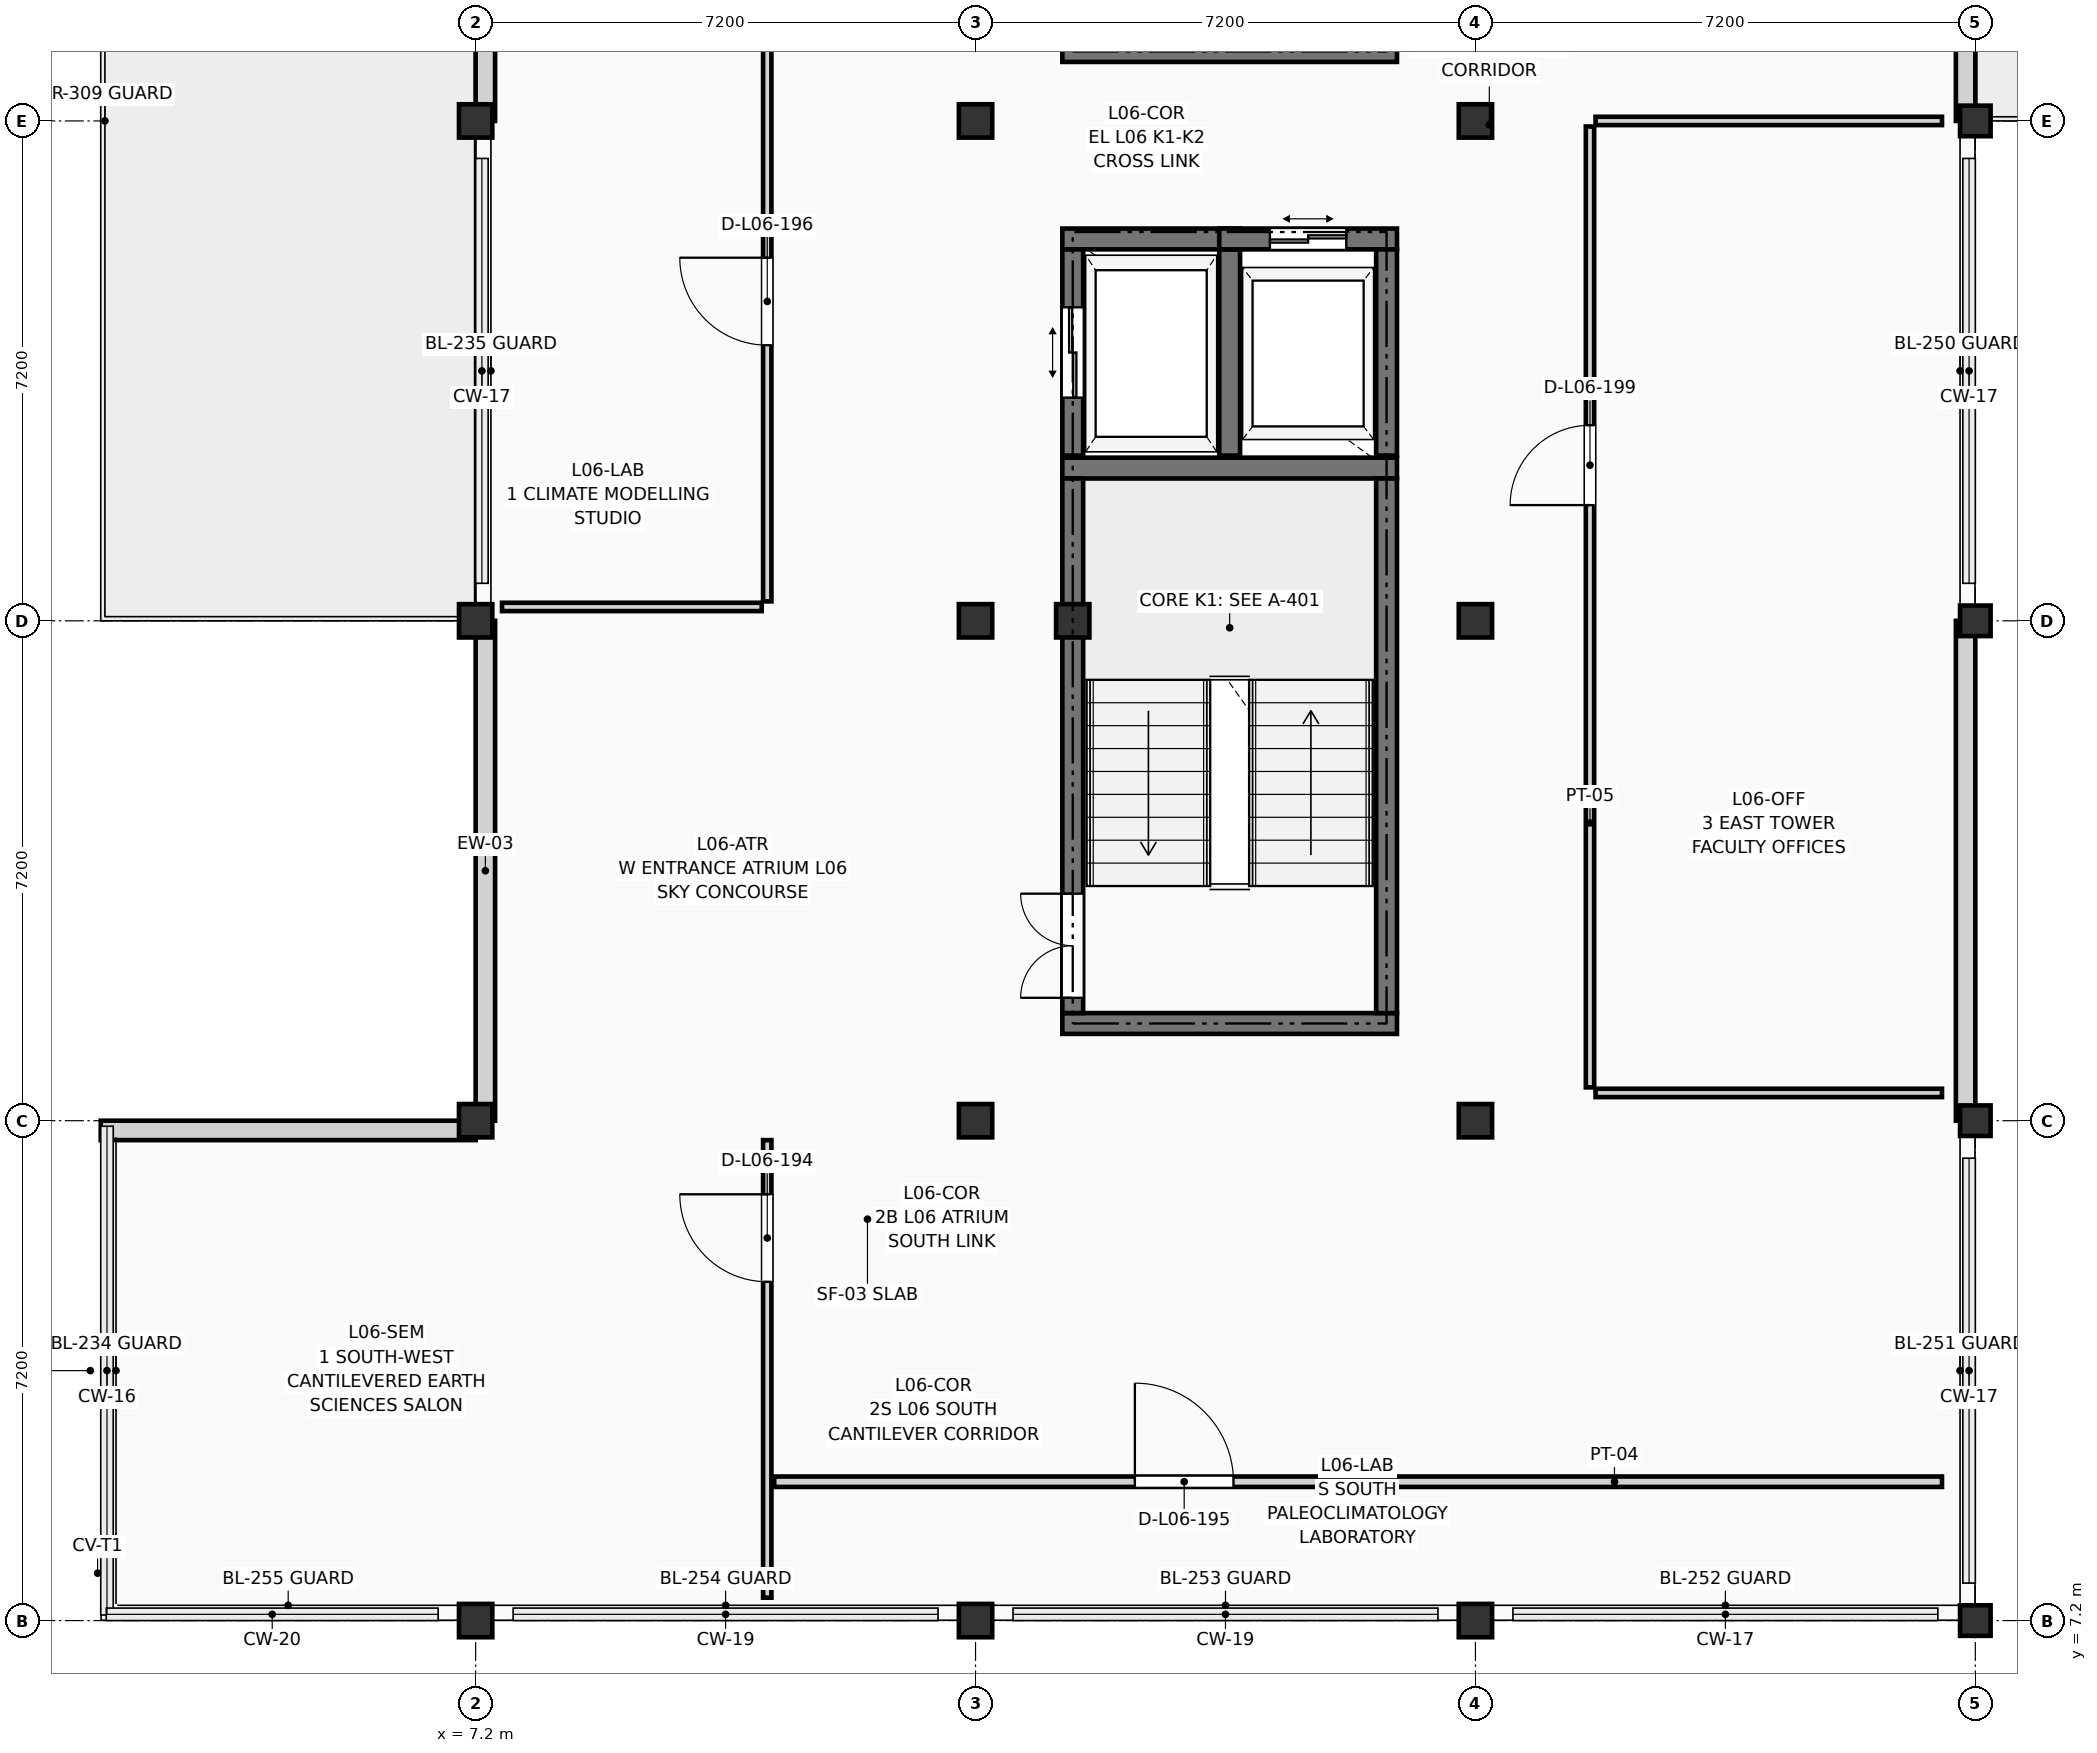
"""IFC4 building model, lengths in metres.
Left out: names, types, materials, properties, quantities, classifications, styles, units other than length and angle.
Written with IfcOpenShell. Run it as: python <this file> out.ifc"""

import sys

from ifc_helpers import new_model, si_unit, direction, frame, frame_2d, origin, origin_2d, place, context, subcontext, project, spatial, rectangle, extrude, element, fill, save


model = new_model("IFC4")
c1 = context("Model", 3, precision=1e-05, world=origin(), true_north=direction((0.0, 1.0)))
c2 = subcontext(c1, "Body", "Model", "MODEL_VIEW")
j1 = project(units=[si_unit("LENGTHUNIT", "METRE"), si_unit("PLANEANGLEUNIT", "RADIAN")], contexts=[c1])
p1 = place(None, origin())
s1 = spatial("IfcSite", under=j1, at=p1, CompositionType="ELEMENT")
p2 = place(p1, origin())
s2 = spatial("IfcBuilding", under=s1, at=p2, CompositionType="ELEMENT")
p3 = place(p2, frame((0.0, 0.0, 22.95)))
s3 = spatial("IfcBuildingStorey", under=s2, at=p3, CompositionType="ELEMENT", Elevation=22.95)
for number, where, z_axis, x_axis in (
    (1, (7.2, 7.2, 0.0), (0.0, 0.0, 1.0), (1.0, 0.0, 0.0)),
    (2, (7.2, 14.4, 0.0), (0.0, 0.0, 1.0), (1.0, 0.0, 0.0)),
    (3, (7.2, 21.6, 0.0), (0.0, 0.0, 1.0), (1.0, 0.0, 0.0)),
    (4, (7.2, 28.8, 0.0), (0.0, 0.0, 1.0), (1.0, 0.0, 0.0)),
    (5, (14.4, 7.2, 0.0), (0.0, 0.0, 1.0), (1.0, 0.0, 0.0)),
    (6, (14.4, 14.4, 0.0), (0.0, 0.0, 1.0), (1.0, 0.0, 0.0)),
    (7, (14.4, 21.6, 0.0), (0.0, 0.0, 1.0), (1.0, 0.0, 0.0)),
    (8, (14.4, 28.8, 0.0), (0.0, 0.0, 1.0), (1.0, 0.0, 0.0)),
    (9, (15.8, 21.6, 0.0), (0.0, 0.0, 1.0), (1.0, 0.0, 0.0)),
    (10, (21.6, 7.2, 0.0), (0.0, 0.0, 1.0), (1.0, 0.0, 0.0)),
    (11, (21.6, 14.4, 0.0), (0.0, 0.0, 1.0), (1.0, 0.0, 0.0)),
    (12, (21.6, 21.6, 0.0), (0.0, 0.0, 1.0), (1.0, 0.0, 0.0)),
    (13, (21.6, 28.8, 0.0), (0.0, 0.0, 1.0), (1.0, 0.0, 0.0)),
):
    element("IfcColumn", number, at=place(p3, frame(where, z_axis=z_axis, x_axis=x_axis)), inside=s3, PredefinedType="COLUMN", context=c2, shape_type="SweptSolid", body=[
        extrude(rectangle(XDim=0.48, YDim=0.48, at=origin_2d()), origin(), (0.0, 0.0, 1.0), 3.3),
    ])
for number, where, z_axis, x_axis in (
    (14, (28.8, 7.2, 0.0), (0.0, 0.0, 1.0), (1.0, 0.0, 0.0)),
    (15, (28.8, 14.4, 0.0), (0.0, 0.0, 1.0), (1.0, 0.0, 0.0)),
    (16, (28.8, 21.6, 0.0), (0.0, 0.0, 1.0), (1.0, 0.0, 0.0)),
    (17, (28.8, 28.8, 0.0), (0.0, 0.0, 1.0), (1.0, 0.0, 0.0)),
):
    element("IfcColumn", number, at=place(p3, frame(where, z_axis=z_axis, x_axis=x_axis)), inside=s3, PredefinedType="COLUMN", context=c2, shape_type="SweptSolid", body=[
        extrude(rectangle(XDim=0.44, YDim=0.44, at=origin_2d()), origin(), (0.0, 0.0, 1.0), 3.3),
    ])
p4 = place(p3, frame((1.8, 14.26, 0.0), z_axis=(0.0, 0.0, 1.0), x_axis=(1.0, 0.0, 0.0)))
e18 = element("IfcWall", 18, at=p4, inside=s3, PredefinedType="SOLIDWALL", context=c2, shape_type="SweptSolid", body=[
    extrude(rectangle(XDim=5.4, YDim=0.28, at=frame_2d((2.7, 0.0))), origin(), (0.0, 0.0, 1.0), 2.396),
])
p5 = place(p3, frame((7.34, 14.4, 0.0), z_axis=(0.0, 0.0, 1.0), x_axis=(0.0, 1.0, 0.0)))
e19 = element("IfcWall", 19, at=p5, inside=s3, PredefinedType="SOLIDWALL", context=c2, shape_type="SweptSolid", body=[
    extrude(rectangle(XDim=7.2, YDim=0.28, at=frame_2d((3.6, 0.0))), origin(), (0.0, 0.0, 1.0), 2.54),
])
p6 = place(p3, frame((7.34, 28.8, 0.0), z_axis=(0.0, 0.0, 1.0), x_axis=(0.0, 1.0, 0.0)))
e20 = element("IfcWall", 20, at=p6, inside=s3, PredefinedType="SOLIDWALL", context=c2, shape_type="SweptSolid", body=[
    extrude(rectangle(XDim=7.2, YDim=0.28, at=frame_2d((3.6, 0.0))), origin(), (0.0, 0.0, 1.0), 2.54),
])
p7 = place(p6, frame((2.9, 0.0, 0.0)))
e21 = element("IfcOpeningElement", 21, at=p7, cuts=e20, PredefinedType="OPENING", context=c2, shape_type="SweptSolid", body=[
    extrude(rectangle(XDim=1.4, YDim=2.2, at=frame_2d((0.7, 1.1))), frame((0.0, 0.152, 0.0), z_axis=(0.0, -1.0, 0.0), x_axis=(1.0, 0.0, 0.0)), (0.0, 0.0, 1.0), 0.304),
])
p8 = place(p3, frame((28.66, 28.8, 0.0), z_axis=(0.0, 0.0, 1.0), x_axis=(0.0, 1.0, 0.0)))
e22 = element("IfcWall", 22, at=p8, inside=s3, PredefinedType="SOLIDWALL", context=c2, shape_type="SweptSolid", body=[
    extrude(rectangle(XDim=7.2, YDim=0.28, at=frame_2d((3.6, 0.0))), origin(), (0.0, 0.0, 1.0), 2.54),
])
p9 = place(p8, frame((2.8, 0.0, 0.0)))
e23 = element("IfcOpeningElement", 23, at=p9, cuts=e22, PredefinedType="OPENING", context=c2, shape_type="SweptSolid", body=[
    extrude(rectangle(XDim=1.6, YDim=2.25, at=frame_2d((0.8, 1.125))), frame((0.0, 0.152, 0.0), z_axis=(0.0, -1.0, 0.0), x_axis=(1.0, 0.0, 0.0)), (0.0, 0.0, 1.0), 0.304),
])
p10 = place(p3, frame((28.66, 14.4, 0.0), z_axis=(0.0, 0.0, 1.0), x_axis=(0.0, 1.0, 0.0)))
e24 = element("IfcWall", 24, at=p10, inside=s3, PredefinedType="SOLIDWALL", context=c2, shape_type="SweptSolid", body=[
    extrude(rectangle(XDim=7.2, YDim=0.28, at=frame_2d((3.6, 0.0))), origin(), (0.0, 0.0, 1.0), 2.54),
])
for number, where, z_axis, x_axis in (
    (25, (15.65, 15.8, 0.0), (0.0, 0.0, 1.0), (1.0, 0.0, 0.0)),
    (26, (15.65, 23.8, 0.0), (0.0, 0.0, 1.0), (1.0, 0.0, 0.0)),
):
    element("IfcWall", number, at=place(p3, frame(where, z_axis=z_axis, x_axis=x_axis)), inside=s3, PredefinedType="SHEAR", context=c2, shape_type="SweptSolid", body=[
        extrude(rectangle(XDim=4.82, YDim=0.3, at=frame_2d((2.41, 0.0))), origin(), (0.0, 0.0, 1.0), 3.09),
    ])
p11 = place(p3, frame((15.8, 15.95, 0.0), z_axis=(0.0, 0.0, 1.0), x_axis=(0.0, 1.0, 0.0)))
e27 = element("IfcWall", 27, at=p11, inside=s3, PredefinedType="SHEAR", context=c2, shape_type="SweptSolid", body=[
    extrude(rectangle(XDim=7.7, YDim=0.3, at=frame_2d((3.85, 0.0))), origin(), (0.0, 0.0, 1.0), 3.09),
])
p12 = place(p11, frame((0.22, 0.0, 0.0)))
e28 = element("IfcOpeningElement", 28, at=p12, cuts=e27, PredefinedType="OPENING", context=c2, shape_type="SweptSolid", body=[
    extrude(rectangle(XDim=1.5, YDim=2.2, at=frame_2d((0.75, 1.1))), frame((0.0, 0.162, 0.0), z_axis=(0.0, -1.0, 0.0), x_axis=(1.0, 0.0, 0.0)), (0.0, 0.0, 1.0), 0.324),
])
p13 = place(p3, frame((20.32, 15.95, 0.0), z_axis=(0.0, 0.0, 1.0), x_axis=(0.0, 1.0, 0.0)))
e29 = element("IfcWall", 29, at=p13, inside=s3, PredefinedType="SHEAR", context=c2, shape_type="SweptSolid", body=[
    extrude(rectangle(XDim=7.7, YDim=0.3, at=frame_2d((3.85, 0.0))), origin(), (0.0, 0.0, 1.0), 3.09),
])
p14 = place(p3, frame((15.65, 29.8, 0.0), z_axis=(0.0, 0.0, 1.0), x_axis=(1.0, 0.0, 0.0)))
e30 = element("IfcWall", 30, at=p14, inside=s3, PredefinedType="SHEAR", context=c2, shape_type="SweptSolid", body=[
    extrude(rectangle(XDim=4.82, YDim=0.3, at=frame_2d((2.41, 0.0))), origin(), (0.0, 0.0, 1.0), 3.09),
])
p15 = place(p3, frame((15.65, 27.1, 0.0), z_axis=(0.0, 0.0, 1.0), x_axis=(1.0, 0.0, 0.0)))
e31 = element("IfcWall", 31, at=p15, inside=s3, PredefinedType="SHEAR", context=c2, shape_type="SweptSolid", body=[
    extrude(rectangle(XDim=2.56, YDim=0.3, at=frame_2d((1.28, 0.0))), origin(), (0.0, 0.0, 1.0), 3.09),
])
p16 = place(p3, frame((15.8, 23.98, 0.0), z_axis=(0.0, 0.0, 1.0), x_axis=(0.0, 1.0, 0.0)))
e32 = element("IfcWall", 32, at=p16, inside=s3, PredefinedType="SHEAR", context=c2, shape_type="SweptSolid", body=[
    extrude(rectangle(XDim=2.97, YDim=0.3, at=frame_2d((1.485, 0.0))), origin(), (0.0, 0.0, 1.0), 3.09),
])
p17 = place(p16, frame((0.835, 0.0, 0.0)))
e33 = element("IfcOpeningElement", 33, at=p17, cuts=e32, PredefinedType="OPENING", context=c2, shape_type="SweptSolid", body=[
    extrude(rectangle(XDim=1.3, YDim=2.25, at=frame_2d((0.65, 1.125))), frame((0.0, 0.162, 0.0), z_axis=(0.0, -1.0, 0.0), x_axis=(1.0, 0.0, 0.0)), (0.0, 0.0, 1.0), 0.324),
])
p18 = place(p3, frame((18.06, 23.98, 0.0), z_axis=(0.0, 0.0, 1.0), x_axis=(0.0, 1.0, 0.0)))
e34 = element("IfcWall", 34, at=p18, inside=s3, PredefinedType="SHEAR", context=c2, shape_type="SweptSolid", body=[
    extrude(rectangle(XDim=2.97, YDim=0.3, at=frame_2d((1.485, 0.0))), origin(), (0.0, 0.0, 1.0), 3.09),
])
p19 = place(p3, frame((17.91, 27.1, 0.0), z_axis=(0.0, 0.0, 1.0), x_axis=(1.0, 0.0, 0.0)))
e35 = element("IfcWall", 35, at=p19, inside=s3, PredefinedType="SHEAR", context=c2, shape_type="SweptSolid", body=[
    extrude(rectangle(XDim=2.56, YDim=0.3, at=frame_2d((1.28, 0.0))), origin(), (0.0, 0.0, 1.0), 3.09),
])
p20 = place(p19, frame((0.73, 0.0, 0.0)))
e36 = element("IfcOpeningElement", 36, at=p20, cuts=e35, PredefinedType="OPENING", context=c2, shape_type="SweptSolid", body=[
    extrude(rectangle(XDim=1.1, YDim=2.2, at=frame_2d((0.55, 1.1))), frame((0.0, 0.162, 0.0), z_axis=(0.0, -1.0, 0.0), x_axis=(1.0, 0.0, 0.0)), (0.0, 0.0, 1.0), 0.324),
])
p21 = place(p3, frame((20.32, 23.98, 0.0), z_axis=(0.0, 0.0, 1.0), x_axis=(0.0, 1.0, 0.0)))
e37 = element("IfcWall", 37, at=p21, inside=s3, PredefinedType="SHEAR", context=c2, shape_type="SweptSolid", body=[
    extrude(rectangle(XDim=2.97, YDim=0.3, at=frame_2d((1.485, 0.0))), origin(), (0.0, 0.0, 1.0), 3.09),
])
p22 = place(p3, frame((11.4, 7.53, 0.0), z_axis=(0.0, 0.0, 1.0), x_axis=(0.0, 1.0, 0.0)))
e38 = element("IfcWall", 38, at=p22, inside=s3, PredefinedType="PARTITIONING", context=c2, shape_type="SweptSolid", body=[
    extrude(rectangle(XDim=6.59, YDim=0.12, at=frame_2d((3.295, 0.0))), origin(), (0.0, 0.0, 1.0), 3.075),
])
p23 = place(p22, frame((4.55, 0.0, 0.0)))
e39 = element("IfcOpeningElement", 39, at=p23, cuts=e38, PredefinedType="OPENING", context=c2, shape_type="SweptSolid", body=[
    extrude(rectangle(XDim=1.26, YDim=2.18, at=frame_2d((0.63, 1.09))), frame((0.0, 0.072, 0.0), z_axis=(0.0, -1.0, 0.0), x_axis=(1.0, 0.0, 0.0)), (0.0, 0.0, 1.0), 0.144),
])
p24 = place(p3, frame((11.5, 9.2, 0.0), z_axis=(0.0, 0.0, 1.0), x_axis=(1.0, 0.0, 0.0)))
e40 = element("IfcWall", 40, at=p24, inside=s3, PredefinedType="PARTITIONING", context=c2, shape_type="SweptSolid", body=[
    extrude(rectangle(XDim=16.82, YDim=0.15, at=frame_2d((8.41, 0.0))), origin(), (0.0, 0.0, 1.0), 3.075),
])
p25 = place(p24, frame((5.195, 0.0, 0.0)))
e41 = element("IfcOpeningElement", 41, at=p25, cuts=e40, PredefinedType="OPENING", context=c2, shape_type="SweptSolid", body=[
    extrude(rectangle(XDim=1.42, YDim=2.22, at=frame_2d((0.71, 1.11))), frame((0.0, 0.087, 0.0), z_axis=(0.0, -1.0, 0.0), x_axis=(1.0, 0.0, 0.0)), (0.0, 0.0, 1.0), 0.174),
])
p26 = place(p3, frame((7.58, 21.8, 0.0), z_axis=(0.0, 0.0, 1.0), x_axis=(1.0, 0.0, 0.0)))
e42 = element("IfcWall", 42, at=p26, inside=s3, PredefinedType="PARTITIONING", context=c2, shape_type="SweptSolid", body=[
    extrude(rectangle(XDim=3.74, YDim=0.12, at=frame_2d((1.87, 0.0))), origin(), (0.0, 0.0, 1.0), 2.415),
])
p27 = place(p3, frame((11.4, 21.88, 0.0), z_axis=(0.0, 0.0, 1.0), x_axis=(0.0, 1.0, 0.0)))
e43 = element("IfcWall", 43, at=p27, inside=s3, PredefinedType="PARTITIONING", context=c2, shape_type="SweptSolid", body=[
    extrude(rectangle(XDim=8.64, YDim=0.12, at=frame_2d((4.32, 0.0))), origin(), (0.0, 0.0, 1.0), 3.075),
])
p28 = place(p27, frame((3.69, 0.0, 0.0)))
e44 = element("IfcOpeningElement", 44, at=p28, cuts=e43, PredefinedType="OPENING", context=c2, shape_type="SweptSolid", body=[
    extrude(rectangle(XDim=1.26, YDim=2.18, at=frame_2d((0.63, 1.09))), frame((0.0, 0.072, 0.0), z_axis=(0.0, -1.0, 0.0), x_axis=(1.0, 0.0, 0.0)), (0.0, 0.0, 1.0), 0.144),
])
p29 = place(p3, frame((23.25, 14.88, 0.0), z_axis=(0.0, 0.0, 1.0), x_axis=(0.0, 1.0, 0.0)))
e45 = element("IfcWall", 45, at=p29, inside=s3, PredefinedType="PARTITIONING", context=c2, shape_type="SweptSolid", body=[
    extrude(rectangle(XDim=13.84, YDim=0.12, at=frame_2d((6.92, 0.0))), origin(), (0.0, 0.0, 1.0), 3.075),
])
p30 = place(p29, frame((8.387, 0.0, 0.0)))
e46 = element("IfcOpeningElement", 46, at=p30, cuts=e45, PredefinedType="OPENING", context=c2, shape_type="SweptSolid", body=[
    extrude(rectangle(XDim=1.15, YDim=2.18, at=frame_2d((0.575, 1.09))), frame((0.0, 0.072, 0.0), z_axis=(0.0, -1.0, 0.0), x_axis=(1.0, 0.0, 0.0)), (0.0, 0.0, 1.0), 0.144),
])
p31 = place(p3, frame((23.33, 14.8, 0.0), z_axis=(0.0, 0.0, 1.0), x_axis=(1.0, 0.0, 0.0)))
e47 = element("IfcWall", 47, at=p31, inside=s3, PredefinedType="PARTITIONING", context=c2, shape_type="SweptSolid", body=[
    extrude(rectangle(XDim=4.99, YDim=0.12, at=frame_2d((2.495, 0.0))), origin(), (0.0, 0.0, 1.0), 3.075),
])
p32 = place(p3, frame((23.33, 28.8, 0.0), z_axis=(0.0, 0.0, 1.0), x_axis=(1.0, 0.0, 0.0)))
e48 = element("IfcWall", 48, at=p32, inside=s3, PredefinedType="PARTITIONING", context=c2, shape_type="SweptSolid", body=[
    extrude(rectangle(XDim=4.99, YDim=0.12, at=frame_2d((2.495, 0.0))), origin(), (0.0, 0.0, 1.0), 2.415),
])
p33 = place(p12, origin())
e49 = element("IfcDoor", 49, at=p33, inside=s3, OperationType="DOUBLE_DOOR_SINGLE_SWING", PredefinedType="DOOR", context=c2, shape_type="SweptSolid", body=[
    extrude(rectangle(XDim=1.5, YDim=2.2, at=frame_2d((0.75, 1.1))), frame((0.0, 0.025, 0.0), z_axis=(0.0, -1.0, 0.0), x_axis=(1.0, 0.0, 0.0)), (0.0, 0.0, 1.0), 0.05),
])
fill(e28, e49)
p34 = place(p17, origin())
e50 = element("IfcDoor", 50, at=p34, inside=s3, OperationType="DOUBLE_DOOR_SLIDING", PredefinedType="DOOR", context=c2, shape_type="SweptSolid", body=[
    extrude(rectangle(XDim=1.3, YDim=2.25, at=frame_2d((0.65, 1.125))), frame((0.0, 0.025, 0.0), z_axis=(0.0, -1.0, 0.0), x_axis=(1.0, 0.0, 0.0)), (0.0, 0.0, 1.0), 0.05),
])
fill(e33, e50)
p35 = place(p20, origin())
e51 = element("IfcDoor", 51, at=p35, inside=s3, OperationType="DOUBLE_DOOR_SLIDING", PredefinedType="DOOR", context=c2, shape_type="SweptSolid", body=[
    extrude(rectangle(XDim=1.1, YDim=2.2, at=frame_2d((0.55, 1.1))), frame((0.0, 0.025, 0.0), z_axis=(0.0, -1.0, 0.0), x_axis=(1.0, 0.0, 0.0)), (0.0, 0.0, 1.0), 0.05),
])
fill(e36, e51)
p36 = place(p23, origin())
e52 = element("IfcDoor", 52, at=p36, inside=s3, OperationType="SINGLE_SWING_RIGHT", PredefinedType="DOOR", context=c2, shape_type="SweptSolid", body=[
    extrude(rectangle(XDim=1.26, YDim=2.18, at=frame_2d((0.63, 1.09))), frame((0.0, 0.025, 0.0), z_axis=(0.0, -1.0, 0.0), x_axis=(1.0, 0.0, 0.0)), (0.0, 0.0, 1.0), 0.05),
])
fill(e39, e52)
p37 = place(p25, origin())
e53 = element("IfcDoor", 53, at=p37, inside=s3, OperationType="SINGLE_SWING_LEFT", PredefinedType="DOOR", context=c2, shape_type="SweptSolid", body=[
    extrude(rectangle(XDim=1.42, YDim=2.22, at=frame_2d((0.71, 1.11))), frame((0.0, 0.025, 0.0), z_axis=(0.0, -1.0, 0.0), x_axis=(1.0, 0.0, 0.0)), (0.0, 0.0, 1.0), 0.05),
])
fill(e41, e53)
p38 = place(p28, origin())
e54 = element("IfcDoor", 54, at=p38, inside=s3, OperationType="SINGLE_SWING_RIGHT", PredefinedType="DOOR", context=c2, shape_type="SweptSolid", body=[
    extrude(rectangle(XDim=1.26, YDim=2.18, at=frame_2d((0.63, 1.09))), frame((0.0, 0.025, 0.0), z_axis=(0.0, -1.0, 0.0), x_axis=(1.0, 0.0, 0.0)), (0.0, 0.0, 1.0), 0.05),
])
fill(e44, e54)
p39 = place(p30, origin())
e55 = element("IfcDoor", 55, at=p39, inside=s3, OperationType="SINGLE_SWING_LEFT", PredefinedType="DOOR", context=c2, shape_type="SweptSolid", body=[
    extrude(rectangle(XDim=1.15, YDim=2.18, at=frame_2d((0.575, 1.09))), frame((0.0, 0.025, 0.0), z_axis=(0.0, -1.0, 0.0), x_axis=(1.0, 0.0, 0.0)), (0.0, 0.0, 1.0), 0.05),
])
fill(e46, e55)
save(model, sys.argv[1])
